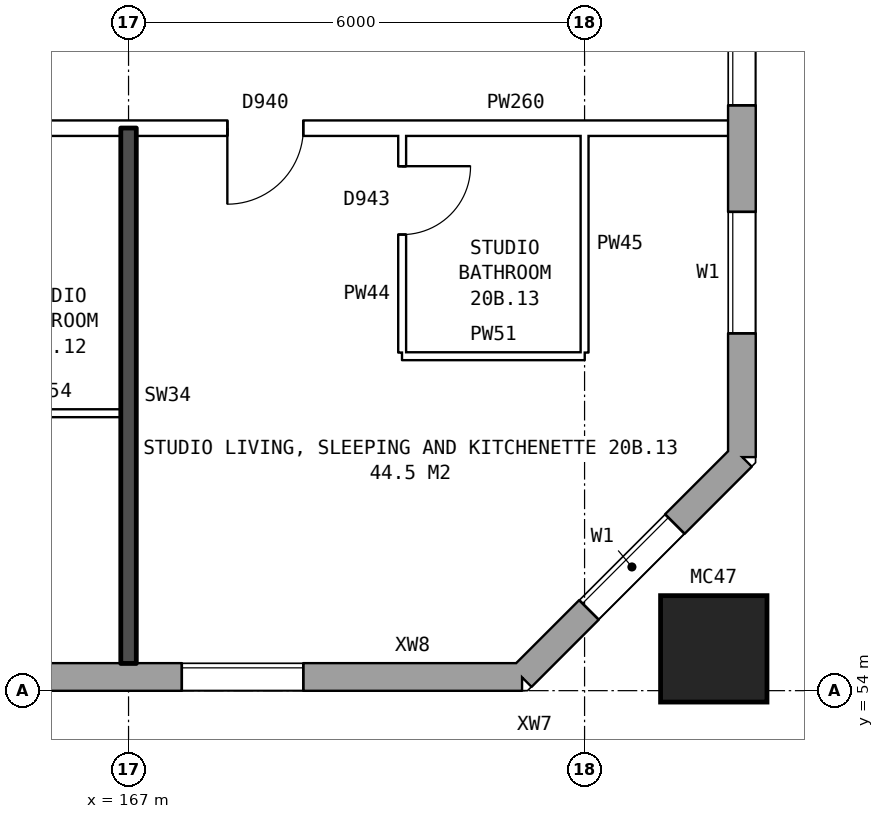
"""IFC4 building model, lengths in metres.
Left out: names, types, materials, properties, quantities, classifications, styles, units other than length and angle.
Written with IfcOpenShell. Run it as: python <this file> out.ifc"""

import sys

from ifc_helpers import new_model, si_unit, direction, frame, frame_2d, origin, origin_2d, place, context, subcontext, project, spatial, rectangle, hollow_rectangle, extrude, element, fill, save


model = new_model("IFC4")
c1 = context("Model", 3, precision=1e-05, world=origin(), true_north=direction((0.0, 1.0)))
c2 = subcontext(c1, "Body", "Model", "MODEL_VIEW")
j1 = project(units=[si_unit("LENGTHUNIT", "METRE"), si_unit("PLANEANGLEUNIT", "RADIAN")], contexts=[c1])
p1 = place(None, origin())
s1 = spatial("IfcSite", under=j1, at=p1, CompositionType="ELEMENT")
p2 = place(p1, origin())
s2 = spatial("IfcBuilding", under=s1, at=p2, CompositionType="ELEMENT")
p3 = place(p2, frame((0.0, 0.0, 74.7)))
s3 = spatial("IfcBuildingStorey", under=s2, at=p3, CompositionType="ELEMENT", Elevation=74.7)
p4 = place(p3, frame((174.7, 54.55, 0.0), z_axis=(0.0, 0.0, 1.0), x_axis=(1.0, 0.0, 0.0)))
e1 = element("IfcColumn", 1, at=p4, inside=s3, PredefinedType="COLUMN", context=c2, shape_type="SweptSolid", body=[
    extrude(hollow_rectangle(XDim=1.4, YDim=1.4, WallThickness=0.075, at=origin_2d()), origin(), (0.0, 0.0, 1.0), 3.1),
])
p5 = place(p3, frame((134.075, 54.18, 0.0), z_axis=(0.0, 0.0, 1.0), x_axis=(1.0, 0.0, 0.0)))
e2 = element("IfcWall", 2, at=p5, inside=s3, PredefinedType="STANDARD", context=c2, shape_type="SweptSolid", body=[
    extrude(rectangle(XDim=38.101, YDim=0.36, at=frame_2d((19.05, 0.0))), origin(), (0.0, 0.0, 1.0), 2.85),
])
p6 = place(p5, frame((0.625, 0.0, 0.8)))
e3 = element("IfcOpeningElement", 3, at=p6, cuts=e2, PredefinedType="OPENING", context=c2, shape_type="SweptSolid", body=[
    extrude(rectangle(XDim=1.6, YDim=1.8, at=frame_2d((0.8, 0.9))), frame((0.0, 0.19, 0.0), z_axis=(0.0, -1.0, 0.0), x_axis=(1.0, 0.0, 0.0)), (0.0, 0.0, 1.0), 0.38),
])
p7 = place(p5, frame((3.125, 0.0, 0.8)))
e4 = element("IfcOpeningElement", 4, at=p7, cuts=e2, PredefinedType="OPENING", context=c2, shape_type="SweptSolid", body=[
    extrude(rectangle(XDim=1.2, YDim=1.8, at=frame_2d((0.6, 0.9))), frame((0.0, 0.19, 0.0), z_axis=(0.0, -1.0, 0.0), x_axis=(1.0, 0.0, 0.0)), (0.0, 0.0, 1.0), 0.38),
])
p8 = place(p5, frame((4.625, 0.0, 1.6)))
e5 = element("IfcOpeningElement", 5, at=p8, cuts=e2, PredefinedType="OPENING", context=c2, shape_type="SweptSolid", body=[
    extrude(rectangle(XDim=0.6, YDim=0.9, at=frame_2d((0.3, 0.45))), frame((0.0, 0.19, 0.0), z_axis=(0.0, -1.0, 0.0), x_axis=(1.0, 0.0, 0.0)), (0.0, 0.0, 1.0), 0.38),
])
p9 = place(p5, frame((9.625, 0.0, 0.8)))
e6 = element("IfcOpeningElement", 6, at=p9, cuts=e2, PredefinedType="OPENING", context=c2, shape_type="SweptSolid", body=[
    extrude(rectangle(XDim=1.6, YDim=1.8, at=frame_2d((0.8, 0.9))), frame((0.0, 0.19, 0.0), z_axis=(0.0, -1.0, 0.0), x_axis=(1.0, 0.0, 0.0)), (0.0, 0.0, 1.0), 0.38),
])
p10 = place(p5, frame((12.625, 0.0, 0.8)))
e7 = element("IfcOpeningElement", 7, at=p10, cuts=e2, PredefinedType="OPENING", context=c2, shape_type="SweptSolid", body=[
    extrude(rectangle(XDim=1.6, YDim=1.8, at=frame_2d((0.8, 0.9))), frame((0.0, 0.19, 0.0), z_axis=(0.0, -1.0, 0.0), x_axis=(1.0, 0.0, 0.0)), (0.0, 0.0, 1.0), 0.38),
])
p11 = place(p5, frame((15.625, 0.0, 0.8)))
e8 = element("IfcOpeningElement", 8, at=p11, cuts=e2, PredefinedType="OPENING", context=c2, shape_type="SweptSolid", body=[
    extrude(rectangle(XDim=1.6, YDim=1.8, at=frame_2d((0.8, 0.9))), frame((0.0, 0.19, 0.0), z_axis=(0.0, -1.0, 0.0), x_axis=(1.0, 0.0, 0.0)), (0.0, 0.0, 1.0), 0.38),
])
p12 = place(p5, frame((18.625, 0.0, 0.8)))
e9 = element("IfcOpeningElement", 9, at=p12, cuts=e2, PredefinedType="OPENING", context=c2, shape_type="SweptSolid", body=[
    extrude(rectangle(XDim=1.6, YDim=1.8, at=frame_2d((0.8, 0.9))), frame((0.0, 0.19, 0.0), z_axis=(0.0, -1.0, 0.0), x_axis=(1.0, 0.0, 0.0)), (0.0, 0.0, 1.0), 0.38),
])
p13 = place(p5, frame((21.625, 0.0, 0.8)))
e10 = element("IfcOpeningElement", 10, at=p13, cuts=e2, PredefinedType="OPENING", context=c2, shape_type="SweptSolid", body=[
    extrude(rectangle(XDim=1.6, YDim=1.8, at=frame_2d((0.8, 0.9))), frame((0.0, 0.19, 0.0), z_axis=(0.0, -1.0, 0.0), x_axis=(1.0, 0.0, 0.0)), (0.0, 0.0, 1.0), 0.38),
])
p14 = place(p5, frame((24.625, 0.0, 0.8)))
e11 = element("IfcOpeningElement", 11, at=p14, cuts=e2, PredefinedType="OPENING", context=c2, shape_type="SweptSolid", body=[
    extrude(rectangle(XDim=1.6, YDim=1.8, at=frame_2d((0.8, 0.9))), frame((0.0, 0.19, 0.0), z_axis=(0.0, -1.0, 0.0), x_axis=(1.0, 0.0, 0.0)), (0.0, 0.0, 1.0), 0.38),
])
p15 = place(p5, frame((27.625, 0.0, 0.8)))
e12 = element("IfcOpeningElement", 12, at=p15, cuts=e2, PredefinedType="OPENING", context=c2, shape_type="SweptSolid", body=[
    extrude(rectangle(XDim=1.6, YDim=1.8, at=frame_2d((0.8, 0.9))), frame((0.0, 0.19, 0.0), z_axis=(0.0, -1.0, 0.0), x_axis=(1.0, 0.0, 0.0)), (0.0, 0.0, 1.0), 0.38),
])
p16 = place(p5, frame((29.525, 0.0, 0.8)))
e13 = element("IfcOpeningElement", 13, at=p16, cuts=e2, PredefinedType="OPENING", context=c2, shape_type="SweptSolid", body=[
    extrude(rectangle(XDim=1.0, YDim=1.8, at=frame_2d((0.5, 0.9))), frame((0.0, 0.19, 0.0), z_axis=(0.0, -1.0, 0.0), x_axis=(1.0, 0.0, 0.0)), (0.0, 0.0, 1.0), 0.38),
])
p17 = place(p5, frame((33.625, 0.0, 0.8)))
e14 = element("IfcOpeningElement", 14, at=p17, cuts=e2, PredefinedType="OPENING", context=c2, shape_type="SweptSolid", body=[
    extrude(rectangle(XDim=1.6, YDim=1.8, at=frame_2d((0.8, 0.9))), frame((0.0, 0.19, 0.0), z_axis=(0.0, -1.0, 0.0), x_axis=(1.0, 0.0, 0.0)), (0.0, 0.0, 1.0), 0.38),
])
p18 = place(p5, frame((6.525, 0.0, 0.8)))
e15 = element("IfcOpeningElement", 15, at=p18, cuts=e2, PredefinedType="OPENING", context=c2, shape_type="SweptSolid", body=[
    extrude(rectangle(XDim=0.6, YDim=0.9, at=frame_2d((0.3, 0.45))), frame((0.0, 0.19, 0.0), z_axis=(0.0, -1.0, 0.0), x_axis=(1.0, 0.0, 0.0)), (0.0, 0.0, 1.0), 0.38),
])
p19 = place(p5, frame((7.425, 0.0, 0.8)))
e16 = element("IfcOpeningElement", 16, at=p19, cuts=e2, PredefinedType="OPENING", context=c2, shape_type="SweptSolid", body=[
    extrude(rectangle(XDim=1.2, YDim=1.8, at=frame_2d((0.6, 0.9))), frame((0.0, 0.19, 0.0), z_axis=(0.0, -1.0, 0.0), x_axis=(1.0, 0.0, 0.0)), (0.0, 0.0, 1.0), 0.38),
])
p20 = place(p5, frame((30.825, 0.0, 0.8)))
e17 = element("IfcOpeningElement", 17, at=p20, cuts=e2, PredefinedType="OPENING", context=c2, shape_type="SweptSolid", body=[
    extrude(rectangle(XDim=0.6, YDim=0.9, at=frame_2d((0.3, 0.45))), frame((0.0, 0.19, 0.0), z_axis=(0.0, -1.0, 0.0), x_axis=(1.0, 0.0, 0.0)), (0.0, 0.0, 1.0), 0.38),
])
p21 = place(p3, frame((172.175, 54.18, 0.0), z_axis=(0.0, 0.0, 1.0), x_axis=(0.707106781187, 0.707106781187, 0.0)))
e18 = element("IfcWall", 18, at=p21, inside=s3, PredefinedType="STANDARD", context=c2, shape_type="SweptSolid", body=[
    extrude(rectangle(XDim=4.094, YDim=0.36, at=frame_2d((2.047, 0.0))), origin(), (0.0, 0.0, 1.0), 2.85),
])
p22 = place(p21, frame((1.247, 0.0, 0.8)))
e19 = element("IfcOpeningElement", 19, at=p22, cuts=e18, PredefinedType="OPENING", context=c2, shape_type="SweptSolid", body=[
    extrude(rectangle(XDim=1.6, YDim=1.8, at=frame_2d((0.8, 0.9))), frame((0.0, 0.19, 0.0), z_axis=(0.0, -1.0, 0.0), x_axis=(1.0, 0.0, 0.0)), (0.0, 0.0, 1.0), 0.38),
])
p23 = place(p3, frame((175.07, 57.075, 0.0), z_axis=(0.0, 0.0, 1.0), x_axis=(0.0, 1.0, 0.0)))
e20 = element("IfcWall", 20, at=p23, inside=s3, PredefinedType="STANDARD", context=c2, shape_type="SweptSolid", body=[
    extrude(rectangle(XDim=25.851, YDim=0.36, at=frame_2d((12.925, 0.0))), origin(), (0.0, 0.0, 1.0), 2.85),
])
p24 = place(p23, frame((1.625, 0.0, 0.8)))
e21 = element("IfcOpeningElement", 21, at=p24, cuts=e20, PredefinedType="OPENING", context=c2, shape_type="SweptSolid", body=[
    extrude(rectangle(XDim=1.6, YDim=1.8, at=frame_2d((0.8, 0.9))), frame((0.0, 0.19, 0.0), z_axis=(0.0, -1.0, 0.0), x_axis=(1.0, 0.0, 0.0)), (0.0, 0.0, 1.0), 0.38),
])
p25 = place(p23, frame((4.625, 0.0, 0.8)))
e22 = element("IfcOpeningElement", 22, at=p25, cuts=e20, PredefinedType="OPENING", context=c2, shape_type="SweptSolid", body=[
    extrude(rectangle(XDim=1.6, YDim=1.8, at=frame_2d((0.8, 0.9))), frame((0.0, 0.19, 0.0), z_axis=(0.0, -1.0, 0.0), x_axis=(1.0, 0.0, 0.0)), (0.0, 0.0, 1.0), 0.38),
])
p26 = place(p23, frame((6.525, 0.0, 0.8)))
e23 = element("IfcOpeningElement", 23, at=p26, cuts=e20, PredefinedType="OPENING", context=c2, shape_type="SweptSolid", body=[
    extrude(rectangle(XDim=1.2, YDim=1.8, at=frame_2d((0.6, 0.9))), frame((0.0, 0.19, 0.0), z_axis=(0.0, -1.0, 0.0), x_axis=(1.0, 0.0, 0.0)), (0.0, 0.0, 1.0), 0.38),
])
p27 = place(p23, frame((8.025, 0.0, 1.7)))
e24 = element("IfcOpeningElement", 24, at=p27, cuts=e20, PredefinedType="OPENING", context=c2, shape_type="SweptSolid", body=[
    extrude(rectangle(XDim=1.0, YDim=0.9, at=frame_2d((0.5, 0.45))), frame((0.0, 0.19, 0.0), z_axis=(0.0, -1.0, 0.0), x_axis=(1.0, 0.0, 0.0)), (0.0, 0.0, 1.0), 0.38),
])
p28 = place(p23, frame((10.125, 0.0, 0.8)))
e25 = element("IfcOpeningElement", 25, at=p28, cuts=e20, PredefinedType="OPENING", context=c2, shape_type="SweptSolid", body=[
    extrude(rectangle(XDim=0.8, YDim=0.9, at=frame_2d((0.4, 0.45))), frame((0.0, 0.19, 0.0), z_axis=(0.0, -1.0, 0.0), x_axis=(1.0, 0.0, 0.0)), (0.0, 0.0, 1.0), 0.38),
])
p29 = place(p23, frame((11.375, 0.0, 0.8)))
e26 = element("IfcOpeningElement", 26, at=p29, cuts=e20, PredefinedType="OPENING", context=c2, shape_type="SweptSolid", body=[
    extrude(rectangle(XDim=1.2, YDim=1.8, at=frame_2d((0.6, 0.9))), frame((0.0, 0.19, 0.0), z_axis=(0.0, -1.0, 0.0), x_axis=(1.0, 0.0, 0.0)), (0.0, 0.0, 1.0), 0.38),
])
p30 = place(p23, frame((19.625, 0.0, 0.8)))
e27 = element("IfcOpeningElement", 27, at=p30, cuts=e20, PredefinedType="OPENING", context=c2, shape_type="SweptSolid", body=[
    extrude(rectangle(XDim=1.6, YDim=1.8, at=frame_2d((0.8, 0.9))), frame((0.0, 0.19, 0.0), z_axis=(0.0, -1.0, 0.0), x_axis=(1.0, 0.0, 0.0)), (0.0, 0.0, 1.0), 0.38),
])
p31 = place(p23, frame((22.625, 0.0, 0.8)))
e28 = element("IfcOpeningElement", 28, at=p31, cuts=e20, PredefinedType="OPENING", context=c2, shape_type="SweptSolid", body=[
    extrude(rectangle(XDim=1.6, YDim=1.8, at=frame_2d((0.8, 0.9))), frame((0.0, 0.19, 0.0), z_axis=(0.0, -1.0, 0.0), x_axis=(1.0, 0.0, 0.0)), (0.0, 0.0, 1.0), 0.38),
])
p32 = place(p23, frame((12.875, 0.0, 0.8)))
e29 = element("IfcOpeningElement", 29, at=p32, cuts=e20, PredefinedType="OPENING", context=c2, shape_type="SweptSolid", body=[
    extrude(rectangle(XDim=1.6, YDim=1.8, at=frame_2d((0.8, 0.9))), frame((0.0, 0.19, 0.0), z_axis=(0.0, -1.0, 0.0), x_axis=(1.0, 0.0, 0.0)), (0.0, 0.0, 1.0), 0.38),
])
p33 = place(p23, frame((14.775, 0.0, 0.8)))
e30 = element("IfcOpeningElement", 30, at=p33, cuts=e20, PredefinedType="OPENING", context=c2, shape_type="SweptSolid", body=[
    extrude(rectangle(XDim=0.8, YDim=0.9, at=frame_2d((0.4, 0.45))), frame((0.0, 0.19, 0.0), z_axis=(0.0, -1.0, 0.0), x_axis=(1.0, 0.0, 0.0)), (0.0, 0.0, 1.0), 0.38),
])
p34 = place(p23, frame((16.725, 0.0, 1.7)))
e31 = element("IfcOpeningElement", 31, at=p34, cuts=e20, PredefinedType="OPENING", context=c2, shape_type="SweptSolid", body=[
    extrude(rectangle(XDim=1.0, YDim=0.9, at=frame_2d((0.5, 0.45))), frame((0.0, 0.19, 0.0), z_axis=(0.0, -1.0, 0.0), x_axis=(1.0, 0.0, 0.0)), (0.0, 0.0, 1.0), 0.38),
])
p35 = place(p23, frame((18.025, 0.0, 0.8)))
e32 = element("IfcOpeningElement", 32, at=p35, cuts=e20, PredefinedType="OPENING", context=c2, shape_type="SweptSolid", body=[
    extrude(rectangle(XDim=1.2, YDim=1.8, at=frame_2d((0.6, 0.9))), frame((0.0, 0.19, 0.0), z_axis=(0.0, -1.0, 0.0), x_axis=(1.0, 0.0, 0.0)), (0.0, 0.0, 1.0), 0.38),
])
p36 = place(p3, frame((165.0, 57.65, 0.0), z_axis=(0.0, 0.0, 1.0), x_axis=(1.0, 0.0, 0.0)))
e33 = element("IfcWall", 33, at=p36, inside=s3, PredefinedType="PARTITIONING", context=c2, shape_type="SweptSolid", body=[
    extrude(rectangle(XDim=1.9, YDim=0.1, at=frame_2d((0.95, 0.0))), origin(), (0.0, 0.0, 1.0), 2.85),
])
p37 = place(p3, frame((170.6, 58.4, 0.0), z_axis=(0.0, 0.0, 1.0), x_axis=(1.0, 0.0, 0.0)))
e34 = element("IfcWall", 34, at=p37, inside=s3, PredefinedType="PARTITIONING", context=c2, shape_type="SweptSolid", body=[
    extrude(rectangle(XDim=2.4, YDim=0.1, at=frame_2d((1.2, 0.0))), origin(), (0.0, 0.0, 1.0), 2.85),
])
p38 = place(p3, frame((155.1, 61.4, 0.0), z_axis=(0.0, 0.0, 1.0), x_axis=(1.0, 0.0, 0.0)))
e35 = element("IfcWall", 35, at=p38, inside=s3, PredefinedType="PARTITIONING", context=c2, shape_type="SweptSolid", body=[
    extrude(rectangle(XDim=19.79, YDim=0.2, at=frame_2d((9.895, 0.0))), origin(), (0.0, 0.0, 1.0), 2.85),
])
p39 = place(p38, frame((1.45, 0.0, 0.0)))
e36 = element("IfcOpeningElement", 36, at=p39, cuts=e35, PredefinedType="OPENING", context=c2, shape_type="SweptSolid", body=[
    extrude(rectangle(XDim=1.0, YDim=2.1, at=frame_2d((0.5, 1.05))), frame((0.0, 0.11, 0.0), z_axis=(0.0, -1.0, 0.0), x_axis=(1.0, 0.0, 0.0)), (0.0, 0.0, 1.0), 0.22),
])
p40 = place(p38, frame((7.4, 0.0, 0.0)))
e37 = element("IfcOpeningElement", 37, at=p40, cuts=e35, PredefinedType="OPENING", context=c2, shape_type="SweptSolid", body=[
    extrude(rectangle(XDim=1.0, YDim=2.1, at=frame_2d((0.5, 1.05))), frame((0.0, 0.11, 0.0), z_axis=(0.0, -1.0, 0.0), x_axis=(1.0, 0.0, 0.0)), (0.0, 0.0, 1.0), 0.22),
])
p41 = place(p38, frame((13.2, 0.0, 0.0)))
e38 = element("IfcOpeningElement", 38, at=p41, cuts=e35, PredefinedType="OPENING", context=c2, shape_type="SweptSolid", body=[
    extrude(rectangle(XDim=1.0, YDim=2.1, at=frame_2d((0.5, 1.05))), frame((0.0, 0.11, 0.0), z_axis=(0.0, -1.0, 0.0), x_axis=(1.0, 0.0, 0.0)), (0.0, 0.0, 1.0), 0.22),
])
p42 = place(p3, frame((167.0, 54.36, 0.0), z_axis=(0.0, 0.0, 1.0), x_axis=(0.0, 1.0, 0.0)))
e39 = element("IfcWall", 39, at=p42, inside=s3, PredefinedType="SOLIDWALL", context=c2, shape_type="SweptSolid", body=[
    extrude(rectangle(XDim=7.04, YDim=0.2, at=frame_2d((3.52, 0.0))), origin(), (0.0, 0.0, 1.0), 2.85),
])
p43 = place(p3, frame((170.6, 58.45, 0.0), z_axis=(0.0, 0.0, 1.0), x_axis=(0.0, 1.0, 0.0)))
e40 = element("IfcWall", 40, at=p43, inside=s3, PredefinedType="PARTITIONING", context=c2, shape_type="SweptSolid", body=[
    extrude(rectangle(XDim=2.85, YDim=0.1, at=frame_2d((1.425, 0.0))), origin(), (0.0, 0.0, 1.0), 2.85),
])
p44 = place(p43, frame((1.55, 0.0, 0.0)))
e41 = element("IfcOpeningElement", 41, at=p44, cuts=e40, PredefinedType="OPENING", context=c2, shape_type="SweptSolid", body=[
    extrude(rectangle(XDim=0.9, YDim=2.1, at=frame_2d((0.45, 1.05))), frame((0.0, 0.06, 0.0), z_axis=(0.0, -1.0, 0.0), x_axis=(1.0, 0.0, 0.0)), (0.0, 0.0, 1.0), 0.12),
])
p45 = place(p3, frame((173.0, 58.45, 0.0), z_axis=(0.0, 0.0, 1.0), x_axis=(0.0, 1.0, 0.0)))
e42 = element("IfcWall", 42, at=p45, inside=s3, PredefinedType="PARTITIONING", context=c2, shape_type="SweptSolid", body=[
    extrude(rectangle(XDim=2.85, YDim=0.1, at=frame_2d((1.425, 0.0))), origin(), (0.0, 0.0, 1.0), 2.85),
])
p46 = place(p17, origin())
e43 = element("IfcWindow", 43, at=p46, inside=s3, PartitioningType="SINGLE_PANEL", PredefinedType="WINDOW", context=c2, shape_type="SweptSolid", body=[
    extrude(rectangle(XDim=1.6, YDim=1.8, at=frame_2d((0.8, 0.9))), frame((0.0, 0.15, 0.0), z_axis=(0.0, -1.0, 0.0), x_axis=(1.0, 0.0, 0.0)), (0.0, 0.0, 1.0), 0.06),
])
fill(e14, e43)
p47 = place(p22, origin())
e44 = element("IfcWindow", 44, at=p47, inside=s3, PartitioningType="SINGLE_PANEL", PredefinedType="WINDOW", context=c2, shape_type="SweptSolid", body=[
    extrude(rectangle(XDim=1.6, YDim=1.8, at=frame_2d((0.8, 0.9))), frame((0.0, 0.15, 0.0), z_axis=(0.0, -1.0, 0.0), x_axis=(1.0, 0.0, 0.0)), (0.0, 0.0, 1.0), 0.06),
])
fill(e19, e44)
p48 = place(p24, origin())
e45 = element("IfcWindow", 45, at=p48, inside=s3, PartitioningType="SINGLE_PANEL", PredefinedType="WINDOW", context=c2, shape_type="SweptSolid", body=[
    extrude(rectangle(XDim=1.6, YDim=1.8, at=frame_2d((0.8, 0.9))), frame((0.0, 0.15, 0.0), z_axis=(0.0, -1.0, 0.0), x_axis=(1.0, 0.0, 0.0)), (0.0, 0.0, 1.0), 0.06),
])
fill(e21, e45)
p49 = place(p25, origin())
e46 = element("IfcWindow", 46, at=p49, inside=s3, PartitioningType="SINGLE_PANEL", PredefinedType="WINDOW", context=c2, shape_type="SweptSolid", body=[
    extrude(rectangle(XDim=1.6, YDim=1.8, at=frame_2d((0.8, 0.9))), frame((0.0, 0.15, 0.0), z_axis=(0.0, -1.0, 0.0), x_axis=(1.0, 0.0, 0.0)), (0.0, 0.0, 1.0), 0.06),
])
fill(e22, e46)
p50 = place(p41, frame((1.0, 0.0, 0.0), z_axis=(0.0, 0.0, 1.0), x_axis=(-1.0, 0.0, 0.0)))
e47 = element("IfcDoor", 47, at=p50, inside=s3, OperationType="SINGLE_SWING_RIGHT", PredefinedType="DOOR", context=c2, shape_type="SweptSolid", body=[
    extrude(rectangle(XDim=1.0, YDim=2.1, at=frame_2d((0.5, 1.05))), frame((0.0, 0.025, 0.0), z_axis=(0.0, -1.0, 0.0), x_axis=(1.0, 0.0, 0.0)), (0.0, 0.0, 1.0), 0.05),
])
fill(e38, e47)
p51 = place(p44, frame((0.9, 0.0, 0.0), z_axis=(0.0, 0.0, 1.0), x_axis=(-1.0, 0.0, 0.0)))
e48 = element("IfcDoor", 48, at=p51, inside=s3, OperationType="SINGLE_SWING_LEFT", PredefinedType="DOOR", context=c2, shape_type="SweptSolid", body=[
    extrude(rectangle(XDim=0.9, YDim=2.1, at=frame_2d((0.45, 1.05))), frame((0.0, 0.025, 0.0), z_axis=(0.0, -1.0, 0.0), x_axis=(1.0, 0.0, 0.0)), (0.0, 0.0, 1.0), 0.05),
])
fill(e41, e48)
save(model, sys.argv[1])
